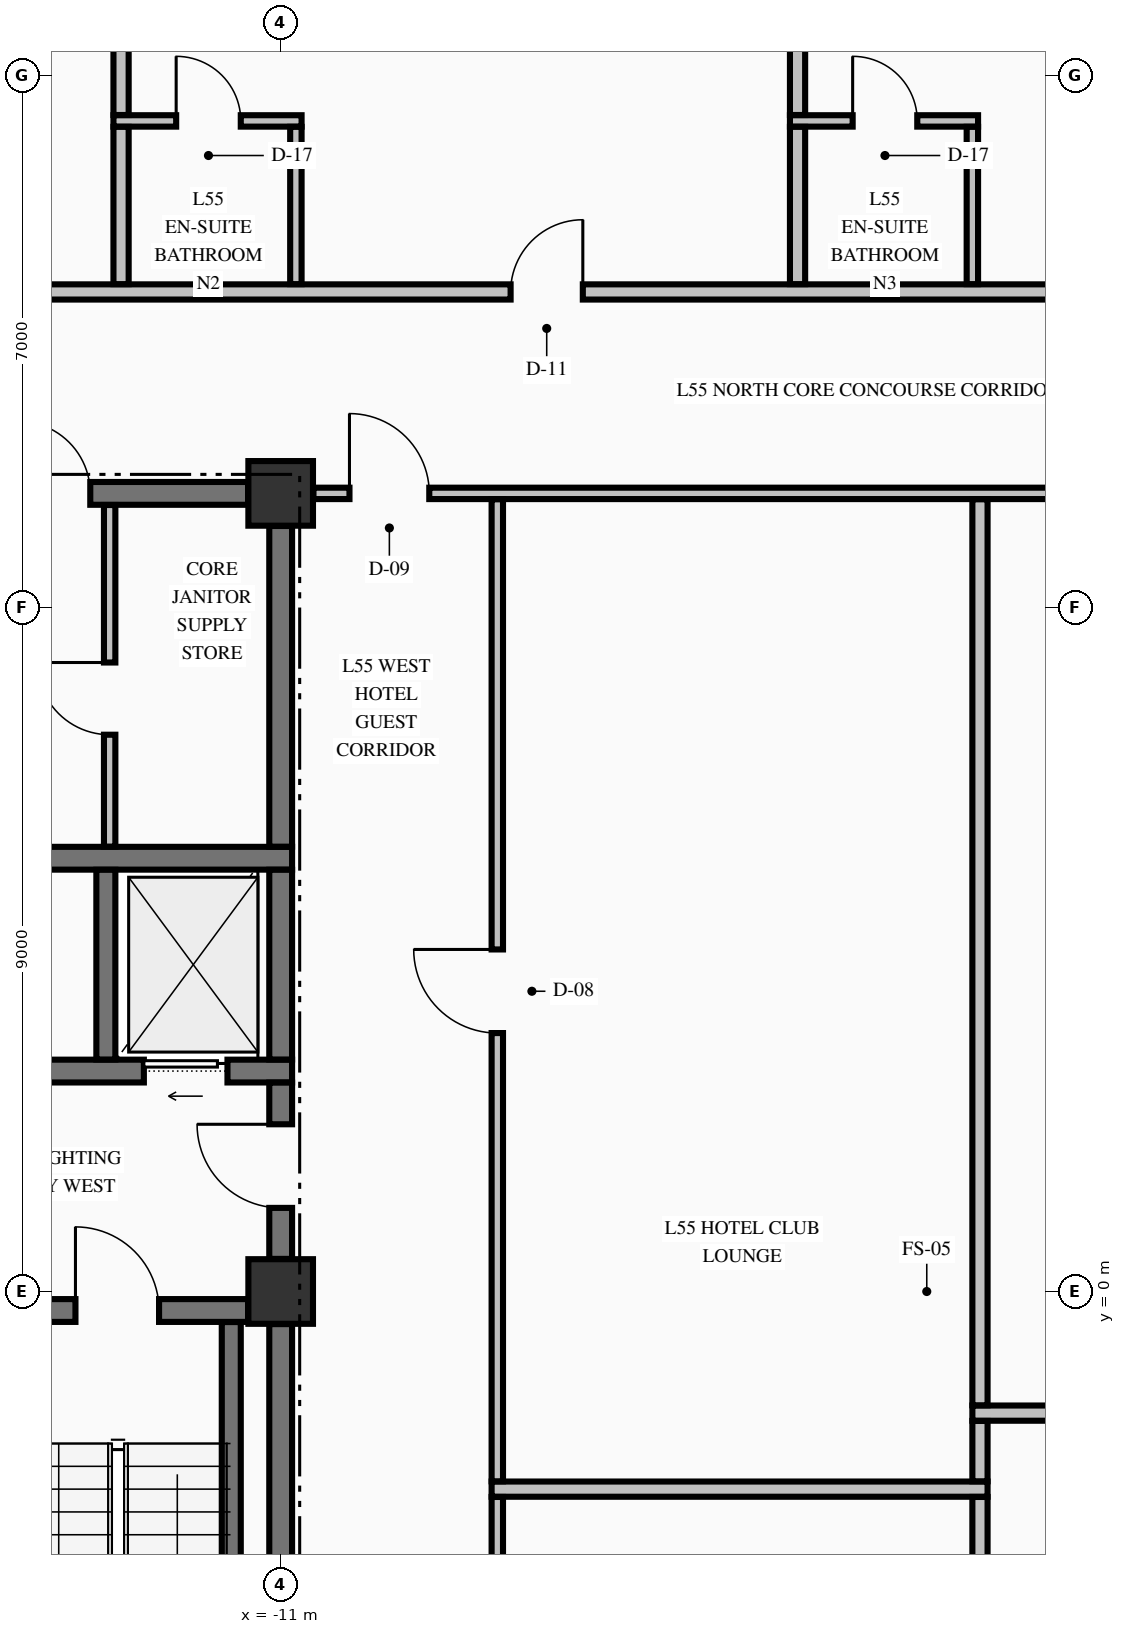
"""IFC4 building model, lengths in metres.
Left out: names, types, materials, properties, quantities, classifications, styles, units other than length and angle.
Written with IfcOpenShell. Run it as: python <this file> out.ifc"""

import sys

from ifc_helpers import new_model, si_unit, direction, frame, frame_2d, origin, origin_2d, place, context, subcontext, project, spatial, rectangle, extrude, element, fill, save


model = new_model("IFC4")
c1 = context("Model", 3, precision=1e-05, world=origin(), true_north=direction((0.0, 1.0)))
c2 = subcontext(c1, "Body", "Model", "MODEL_VIEW")
j1 = project(units=[si_unit("LENGTHUNIT", "METRE"), si_unit("PLANEANGLEUNIT", "RADIAN")], contexts=[c1])
p1 = place(None, origin())
s1 = spatial("IfcSite", under=j1, at=p1, CompositionType="ELEMENT")
p2 = place(p1, origin())
s2 = spatial("IfcBuilding", under=s1, at=p2, CompositionType="ELEMENT")
p3 = place(p2, frame((0.0, 0.0, 211.86)))
s3 = spatial("IfcBuildingStorey", under=s2, at=p3, CompositionType="ELEMENT", Elevation=211.86)
for number, where, z_axis, x_axis in (
    (1, (-11.0, 0.0, -0.325), (0.0, 0.0, 1.0), (1.0, 0.0, 0.0)),
    (2, (-11.0, 10.5, -0.325), (0.0, 0.0, 1.0), (1.0, 0.0, 0.0)),
):
    element("IfcColumn", number, at=place(p3, frame(where, z_axis=z_axis, x_axis=x_axis)), inside=s3, PredefinedType="COLUMN", context=c2, shape_type="SweptSolid", body=[
        extrude(rectangle(XDim=0.85, YDim=0.85, at=origin_2d()), origin(), (0.0, 0.0, 1.0), 3.475),
    ])
p4 = place(p3, frame((-19.571, -0.25, 0.0), z_axis=(0.0, 0.0, 1.0), x_axis=(1.0, 0.0, 0.0)))
e3 = element("IfcWall", 3, at=p4, inside=s3, PredefinedType="SHEAR", context=c2, shape_type="SweptSolid", body=[
    extrude(rectangle(XDim=8.142, YDim=0.3, at=frame_2d((4.071, 0.0))), origin(), (0.0, 0.0, 1.0), 3.15),
])
p5 = place(p4, frame((5.871, 0.0, 0.0)))
e4 = element("IfcOpeningElement", 4, at=p5, cuts=e3, PredefinedType="OPENING", context=c2, shape_type="SweptSolid", body=[
    extrude(rectangle(XDim=1.1, YDim=2.15, at=frame_2d((0.55, 1.075))), frame((0.0, 0.16, 0.0), z_axis=(0.0, -1.0, 0.0), x_axis=(1.0, 0.0, 0.0)), (0.0, 0.0, 1.0), 0.32),
])
p6 = place(p3, frame((-14.875, 2.9, 0.0), z_axis=(0.0, 0.0, 1.0), x_axis=(1.0, 0.0, 0.0)))
e5 = element("IfcWall", 5, at=p6, inside=s3, PredefinedType="SHEAR", context=c2, shape_type="SweptSolid", body=[
    extrude(rectangle(XDim=4.025, YDim=0.3, at=frame_2d((2.012, 0.0))), origin(), (0.0, 0.0, 1.0), 3.15),
])
p7 = place(p6, frame((2.075, 0.0, 0.0)))
e6 = element("IfcOpeningElement", 6, at=p7, cuts=e5, PredefinedType="OPENING", context=c2, shape_type="SweptSolid", body=[
    extrude(rectangle(XDim=1.1, YDim=2.2, at=frame_2d((0.55, 1.1))), frame((0.0, 0.16, 0.0), z_axis=(0.0, -1.0, 0.0), x_axis=(1.0, 0.0, 0.0)), (0.0, 0.0, 1.0), 0.32),
])
p8 = place(p3, frame((-14.875, 5.7, 0.0), z_axis=(0.0, 0.0, 1.0), x_axis=(1.0, 0.0, 0.0)))
e7 = element("IfcWall", 7, at=p8, inside=s3, PredefinedType="SHEAR", context=c2, shape_type="SweptSolid", body=[
    extrude(rectangle(XDim=4.025, YDim=0.3, at=frame_2d((2.012, 0.0))), origin(), (0.0, 0.0, 1.0), 3.15),
])
p9 = place(p3, frame((-14.7, 10.5, 0.0), z_axis=(0.0, 0.0, 1.0), x_axis=(1.0, 0.0, 0.0)))
e8 = element("IfcWall", 8, at=p9, inside=s3, PredefinedType="SHEAR", context=c2, shape_type="SweptSolid", body=[
    extrude(rectangle(XDim=3.271, YDim=0.3, at=frame_2d((1.635, 0.0))), origin(), (0.0, 0.0, 1.0), 3.15),
])
p10 = place(p9, frame((0.245, 0.0, 0.0)))
e9 = element("IfcOpeningElement", 9, at=p10, cuts=e8, PredefinedType="OPENING", context=c2, shape_type="SweptSolid", body=[
    extrude(rectangle(XDim=0.95, YDim=2.15, at=frame_2d((0.475, 1.075))), frame((0.0, 0.16, 0.0), z_axis=(0.0, -1.0, 0.0), x_axis=(1.0, 0.0, 0.0)), (0.0, 0.0, 1.0), 0.32),
])
p11 = place(p3, frame((-8.225, -2.6, 0.0), z_axis=(0.0, 0.0, 1.0), x_axis=(1.0, 0.0, 0.0)))
e10 = element("IfcWall", 10, at=p11, inside=s3, PredefinedType="PARTITIONING", context=c2, shape_type="SweptSolid", body=[
    extrude(rectangle(XDim=6.525, YDim=0.2, at=frame_2d((3.263, 0.0))), origin(), (0.0, 0.0, 1.0), 3.15),
])
p12 = place(p3, frame((-1.9, -1.6, 0.0), z_axis=(0.0, 0.0, 1.0), x_axis=(1.0, 0.0, 0.0)))
e11 = element("IfcWall", 11, at=p12, inside=s3, PredefinedType="PARTITIONING", context=c2, shape_type="SweptSolid", body=[
    extrude(rectangle(XDim=10.125, YDim=0.2, at=frame_2d((5.062, 0.0))), origin(), (0.0, 0.0, 1.0), 3.15),
])
p13 = place(p3, frame((-10.569, 10.5, 0.0), z_axis=(0.0, 0.0, 1.0), x_axis=(1.0, 0.0, 0.0)))
e12 = element("IfcWall", 12, at=p13, inside=s3, PredefinedType="PARTITIONING", context=c2, shape_type="SweptSolid", body=[
    extrude(rectangle(XDim=21.138, YDim=0.15, at=frame_2d((10.569, 0.0))), origin(), (0.0, 0.0, 1.0), 3.15),
])
p14 = place(p13, frame((0.474, 0.0, 0.0)))
e13 = element("IfcOpeningElement", 13, at=p14, cuts=e12, PredefinedType="OPENING", context=c2, shape_type="SweptSolid", body=[
    extrude(rectangle(XDim=1.05, YDim=2.15, at=frame_2d((0.525, 1.075))), frame((0.0, 0.085, 0.0), z_axis=(0.0, -1.0, 0.0), x_axis=(1.0, 0.0, 0.0)), (0.0, 0.0, 1.0), 0.17),
])
p15 = place(p13, frame((19.614, 0.0, 0.0)))
e14 = element("IfcOpeningElement", 14, at=p15, cuts=e12, PredefinedType="OPENING", context=c2, shape_type="SweptSolid", body=[
    extrude(rectangle(XDim=1.05, YDim=2.15, at=frame_2d((0.525, 1.075))), frame((0.0, 0.085, 0.0), z_axis=(0.0, -1.0, 0.0), x_axis=(1.0, 0.0, 0.0)), (0.0, 0.0, 1.0), 0.17),
])
p16 = place(p3, frame((-22.1, 13.15, 0.0), z_axis=(0.0, 0.0, 1.0), x_axis=(1.0, 0.0, 0.0)))
e15 = element("IfcWall", 15, at=p16, inside=s3, PredefinedType="PARTITIONING", context=c2, shape_type="SweptSolid", body=[
    extrude(rectangle(XDim=39.2, YDim=0.2, at=frame_2d((19.6, 0.0))), origin(), (0.0, 0.0, 1.0), 3.15),
])
p17 = place(p16, frame((5.125, 0.0, 0.0)))
e16 = element("IfcOpeningElement", 16, at=p17, cuts=e15, PredefinedType="OPENING", context=c2, shape_type="SweptSolid", body=[
    extrude(rectangle(XDim=1.05, YDim=2.15, at=frame_2d((0.525, 1.075))), frame((0.0, 0.11, 0.0), z_axis=(0.0, -1.0, 0.0), x_axis=(1.0, 0.0, 0.0)), (0.0, 0.0, 1.0), 0.22),
])
p18 = place(p16, frame((14.125, 0.0, 0.0)))
e17 = element("IfcOpeningElement", 17, at=p18, cuts=e15, PredefinedType="OPENING", context=c2, shape_type="SweptSolid", body=[
    extrude(rectangle(XDim=0.95, YDim=2.15, at=frame_2d((0.475, 1.075))), frame((0.0, 0.11, 0.0), z_axis=(0.0, -1.0, 0.0), x_axis=(1.0, 0.0, 0.0)), (0.0, 0.0, 1.0), 0.22),
])
p19 = place(p16, frame((21.375, 0.0, 0.0)))
e18 = element("IfcOpeningElement", 18, at=p19, cuts=e15, PredefinedType="OPENING", context=c2, shape_type="SweptSolid", body=[
    extrude(rectangle(XDim=0.95, YDim=2.15, at=frame_2d((0.475, 1.075))), frame((0.0, 0.11, 0.0), z_axis=(0.0, -1.0, 0.0), x_axis=(1.0, 0.0, 0.0)), (0.0, 0.0, 1.0), 0.22),
])
p20 = place(p16, frame((30.375, 0.0, 0.0)))
e19 = element("IfcOpeningElement", 19, at=p20, cuts=e15, PredefinedType="OPENING", context=c2, shape_type="SweptSolid", body=[
    extrude(rectangle(XDim=0.95, YDim=2.15, at=frame_2d((0.475, 1.075))), frame((0.0, 0.11, 0.0), z_axis=(0.0, -1.0, 0.0), x_axis=(1.0, 0.0, 0.0)), (0.0, 0.0, 1.0), 0.22),
])
p21 = place(p3, frame((-13.2, 15.4, 0.0), z_axis=(0.0, 0.0, 1.0), x_axis=(1.0, 0.0, 0.0)))
e20 = element("IfcWall", 20, at=p21, inside=s3, PredefinedType="PARTITIONING", context=c2, shape_type="SweptSolid", body=[
    extrude(rectangle(XDim=2.475, YDim=0.15, at=frame_2d((1.237, 0.0))), origin(), (0.0, 0.0, 1.0), 3.15),
])
p22 = place(p21, frame((0.825, 0.0, 0.0)))
e21 = element("IfcOpeningElement", 21, at=p22, cuts=e20, PredefinedType="OPENING", context=c2, shape_type="SweptSolid", body=[
    extrude(rectangle(XDim=0.85, YDim=2.1, at=frame_2d((0.425, 1.05))), frame((0.0, 0.085, 0.0), z_axis=(0.0, -1.0, 0.0), x_axis=(1.0, 0.0, 0.0)), (0.0, 0.0, 1.0), 0.17),
])
p23 = place(p3, frame((-4.3, 15.4, 0.0), z_axis=(0.0, 0.0, 1.0), x_axis=(1.0, 0.0, 0.0)))
e22 = element("IfcWall", 22, at=p23, inside=s3, PredefinedType="PARTITIONING", context=c2, shape_type="SweptSolid", body=[
    extrude(rectangle(XDim=2.475, YDim=0.15, at=frame_2d((1.238, 0.0))), origin(), (0.0, 0.0, 1.0), 3.15),
])
p24 = place(p23, frame((0.825, 0.0, 0.0)))
e23 = element("IfcOpeningElement", 23, at=p24, cuts=e22, PredefinedType="OPENING", context=c2, shape_type="SweptSolid", body=[
    extrude(rectangle(XDim=0.85, YDim=2.1, at=frame_2d((0.425, 1.05))), frame((0.0, 0.085, 0.0), z_axis=(0.0, -1.0, 0.0), x_axis=(1.0, 0.0, 0.0)), (0.0, 0.0, 1.0), 0.17),
])
p25 = place(p3, frame((-13.3, 3.052, 0.0), z_axis=(0.0, 0.0, 1.0), x_axis=(0.0, 1.0, 0.0)))
e24 = element("IfcWall", 24, at=p25, inside=s3, PredefinedType="SOLIDWALL", context=c2, shape_type="SweptSolid", body=[
    extrude(rectangle(XDim=2.496, YDim=0.25, at=frame_2d((1.248, 0.0))), origin(), (0.0, 0.0, 1.0), 3.15),
])
p26 = place(p3, frame((-11.65, -9.798, 0.0), z_axis=(0.0, 0.0, 1.0), x_axis=(0.0, 1.0, 0.0)))
e25 = element("IfcWall", 25, at=p26, inside=s3, PredefinedType="SOLIDWALL", context=c2, shape_type="SweptSolid", body=[
    extrude(rectangle(XDim=9.396, YDim=0.25, at=frame_2d((4.698, 0.0))), origin(), (0.0, 0.0, 1.0), 3.15),
])
p27 = place(p3, frame((-11.0, -9.521, 0.0), z_axis=(0.0, 0.0, 1.0), x_axis=(0.0, 1.0, 0.0)))
e26 = element("IfcWall", 26, at=p27, inside=s3, PredefinedType="SHEAR", context=c2, shape_type="SweptSolid", body=[
    extrude(rectangle(XDim=9.092, YDim=0.3, at=frame_2d((4.546, 0.0))), origin(), (0.0, 0.0, 1.0), 3.15),
])
p28 = place(p3, frame((-11.0, 0.429, 0.0), z_axis=(0.0, 0.0, 1.0), x_axis=(0.0, 1.0, 0.0)))
e27 = element("IfcWall", 27, at=p28, inside=s3, PredefinedType="SHEAR", context=c2, shape_type="SweptSolid", body=[
    extrude(rectangle(XDim=2.319, YDim=0.3, at=frame_2d((1.16, 0.0))), origin(), (0.0, 0.0, 1.0), 3.15),
])
p29 = place(p28, frame((0.671, 0.0, 0.0)))
e28 = element("IfcOpeningElement", 28, at=p29, cuts=e27, PredefinedType="OPENING", context=c2, shape_type="SweptSolid", body=[
    extrude(rectangle(XDim=1.1, YDim=2.15, at=frame_2d((0.55, 1.075))), frame((0.0, 0.16, 0.0), z_axis=(0.0, -1.0, 0.0), x_axis=(1.0, 0.0, 0.0)), (0.0, 0.0, 1.0), 0.32),
])
p30 = place(p3, frame((-11.0, 3.052, 0.0), z_axis=(0.0, 0.0, 1.0), x_axis=(0.0, 1.0, 0.0)))
e29 = element("IfcWall", 29, at=p30, inside=s3, PredefinedType="SHEAR", context=c2, shape_type="SweptSolid", body=[
    extrude(rectangle(XDim=2.496, YDim=0.3, at=frame_2d((1.248, 0.0))), origin(), (0.0, 0.0, 1.0), 3.15),
])
p31 = place(p3, frame((-11.0, 5.852, 0.0), z_axis=(0.0, 0.0, 1.0), x_axis=(0.0, 1.0, 0.0)))
e30 = element("IfcWall", 30, at=p31, inside=s3, PredefinedType="SHEAR", context=c2, shape_type="SweptSolid", body=[
    extrude(rectangle(XDim=4.219, YDim=0.3, at=frame_2d((2.109, 0.0))), origin(), (0.0, 0.0, 1.0), 3.15),
])
p32 = place(p3, frame((-13.25, 5.853, 0.0), z_axis=(0.0, 0.0, 1.0), x_axis=(0.0, 1.0, 0.0)))
e31 = element("IfcWall", 31, at=p32, inside=s3, PredefinedType="PARTITIONING", context=c2, shape_type="SweptSolid", body=[
    extrude(rectangle(XDim=4.494, YDim=0.15, at=frame_2d((2.247, 0.0))), origin(), (0.0, 0.0, 1.0), 3.15),
])
p33 = place(p32, frame((1.472, 0.0, 0.0)))
e32 = element("IfcOpeningElement", 32, at=p33, cuts=e31, PredefinedType="OPENING", context=c2, shape_type="SweptSolid", body=[
    extrude(rectangle(XDim=0.95, YDim=2.15, at=frame_2d((0.475, 1.075))), frame((0.0, 0.085, 0.0), z_axis=(0.0, -1.0, 0.0), x_axis=(1.0, 0.0, 0.0)), (0.0, 0.0, 1.0), 0.17),
])
p34 = place(p3, frame((-13.1, 13.253, 0.0), z_axis=(0.0, 0.0, 1.0), x_axis=(0.0, 1.0, 0.0)))
e33 = element("IfcWall", 33, at=p34, inside=s3, PredefinedType="PARTITIONING", context=c2, shape_type="SweptSolid", body=[
    extrude(rectangle(XDim=2.069, YDim=0.2, at=frame_2d((1.035, 0.0))), origin(), (0.0, 0.0, 1.0), 3.15),
])
p35 = place(p3, frame((-13.1, 15.478, 0.0), z_axis=(0.0, 0.0, 1.0), x_axis=(0.0, 1.0, 0.0)))
e34 = element("IfcWall", 34, at=p35, inside=s3, PredefinedType="PARTITIONING", context=c2, shape_type="SweptSolid", body=[
    extrude(rectangle(XDim=8.857, YDim=0.2, at=frame_2d((4.428, 0.0))), origin(), (0.0, 0.0, 1.0), 3.15),
])
p36 = place(p3, frame((-10.8, 13.253, 0.0), z_axis=(0.0, 0.0, 1.0), x_axis=(0.0, 1.0, 0.0)))
e35 = element("IfcWall", 35, at=p36, inside=s3, PredefinedType="PARTITIONING", context=c2, shape_type="SweptSolid", body=[
    extrude(rectangle(XDim=2.069, YDim=0.15, at=frame_2d((1.035, 0.0))), origin(), (0.0, 0.0, 1.0), 2.342),
])
p37 = place(p3, frame((-8.15, -9.872, 0.0), z_axis=(0.0, 0.0, 1.0), x_axis=(0.0, 1.0, 0.0)))
e36 = element("IfcWall", 36, at=p37, inside=s3, PredefinedType="PARTITIONING", context=c2, shape_type="SweptSolid", body=[
    extrude(rectangle(XDim=7.169, YDim=0.15, at=frame_2d((3.584, 0.0))), origin(), (0.0, 0.0, 1.0), 3.15),
])
p38 = place(p37, frame((3.102, 0.0, 0.0)))
e37 = element("IfcOpeningElement", 37, at=p38, cuts=e36, PredefinedType="OPENING", context=c2, shape_type="SweptSolid", body=[
    extrude(rectangle(XDim=1.0, YDim=2.15, at=frame_2d((0.5, 1.075))), frame((0.0, 0.085, 0.0), z_axis=(0.0, -1.0, 0.0), x_axis=(1.0, 0.0, 0.0)), (0.0, 0.0, 1.0), 0.17),
])
p39 = place(p3, frame((-8.15, -2.497, 0.0), z_axis=(0.0, 0.0, 1.0), x_axis=(0.0, 1.0, 0.0)))
e38 = element("IfcWall", 38, at=p39, inside=s3, PredefinedType="PARTITIONING", context=c2, shape_type="SweptSolid", body=[
    extrude(rectangle(XDim=12.919, YDim=0.15, at=frame_2d((6.459, 0.0))), origin(), (0.0, 0.0, 1.0), 3.15),
])
p40 = place(p39, frame((5.897, 0.0, 0.0)))
e39 = element("IfcOpeningElement", 39, at=p40, cuts=e38, PredefinedType="OPENING", context=c2, shape_type="SweptSolid", body=[
    extrude(rectangle(XDim=1.1, YDim=2.15, at=frame_2d((0.55, 1.075))), frame((0.0, 0.085, 0.0), z_axis=(0.0, -1.0, 0.0), x_axis=(1.0, 0.0, 0.0)), (0.0, 0.0, 1.0), 0.17),
])
p41 = place(p3, frame((-4.2, 13.253, 0.0), z_axis=(0.0, 0.0, 1.0), x_axis=(0.0, 1.0, 0.0)))
e40 = element("IfcWall", 40, at=p41, inside=s3, PredefinedType="PARTITIONING", context=c2, shape_type="SweptSolid", body=[
    extrude(rectangle(XDim=2.069, YDim=0.2, at=frame_2d((1.035, 0.0))), origin(), (0.0, 0.0, 1.0), 3.15),
])
p42 = place(p3, frame((-4.2, 15.478, 0.0), z_axis=(0.0, 0.0, 1.0), x_axis=(0.0, 1.0, 0.0)))
e41 = element("IfcWall", 41, at=p42, inside=s3, PredefinedType="PARTITIONING", context=c2, shape_type="SweptSolid", body=[
    extrude(rectangle(XDim=8.857, YDim=0.2, at=frame_2d((4.428, 0.0))), origin(), (0.0, 0.0, 1.0), 3.15),
])
p43 = place(p3, frame((-1.9, 13.253, 0.0), z_axis=(0.0, 0.0, 1.0), x_axis=(0.0, 1.0, 0.0)))
e42 = element("IfcWall", 42, at=p43, inside=s3, PredefinedType="PARTITIONING", context=c2, shape_type="SweptSolid", body=[
    extrude(rectangle(XDim=2.069, YDim=0.15, at=frame_2d((1.035, 0.0))), origin(), (0.0, 0.0, 1.0), 3.15),
])
p44 = place(p3, frame((-1.8, -5.097, 0.0), z_axis=(0.0, 0.0, 1.0), x_axis=(0.0, 1.0, 0.0)))
e43 = element("IfcWall", 43, at=p44, inside=s3, PredefinedType="PARTITIONING", context=c2, shape_type="SweptSolid", body=[
    extrude(rectangle(XDim=2.394, YDim=0.2, at=frame_2d((1.197, 0.0))), origin(), (0.0, 0.0, 1.0), 3.15),
])
p45 = place(p3, frame((-1.8, -2.497, 0.0), z_axis=(0.0, 0.0, 1.0), x_axis=(0.0, 1.0, 0.0)))
e44 = element("IfcWall", 44, at=p45, inside=s3, PredefinedType="PARTITIONING", context=c2, shape_type="SweptSolid", body=[
    extrude(rectangle(XDim=0.794, YDim=0.2, at=frame_2d((0.397, 0.0))), origin(), (0.0, 0.0, 1.0), 3.15),
])
p46 = place(p3, frame((-1.8, -1.497, 0.0), z_axis=(0.0, 0.0, 1.0), x_axis=(0.0, 1.0, 0.0)))
e45 = element("IfcWall", 45, at=p46, inside=s3, PredefinedType="PARTITIONING", context=c2, shape_type="SweptSolid", body=[
    extrude(rectangle(XDim=11.919, YDim=0.2, at=frame_2d((5.959, 0.0))), origin(), (0.0, 0.0, 1.0), 3.15),
])
p47 = place(p5, origin())
e46 = element("IfcDoor", 46, at=p47, inside=s3, OperationType="SINGLE_SWING_LEFT", PredefinedType="DOOR", context=c2, shape_type="SweptSolid", body=[
    extrude(rectangle(XDim=1.1, YDim=2.15, at=frame_2d((0.55, 1.075))), frame((0.0, 0.025, 0.0), z_axis=(0.0, -1.0, 0.0), x_axis=(1.0, 0.0, 0.0)), (0.0, 0.0, 1.0), 0.05),
])
fill(e4, e46)
p48 = place(p29, origin())
e47 = element("IfcDoor", 47, at=p48, inside=s3, OperationType="SINGLE_SWING_RIGHT", PredefinedType="DOOR", context=c2, shape_type="SweptSolid", body=[
    extrude(rectangle(XDim=1.1, YDim=2.15, at=frame_2d((0.55, 1.075))), frame((0.0, 0.025, 0.0), z_axis=(0.0, -1.0, 0.0), x_axis=(1.0, 0.0, 0.0)), (0.0, 0.0, 1.0), 0.05),
])
fill(e28, e47)
p49 = place(p7, origin())
e48 = element("IfcDoor", 48, at=p49, inside=s3, OperationType="SLIDING_TO_LEFT", PredefinedType="DOOR", context=c2, shape_type="SweptSolid", body=[
    extrude(rectangle(XDim=1.1, YDim=2.2, at=frame_2d((0.55, 1.1))), frame((0.0, 0.025, 0.0), z_axis=(0.0, -1.0, 0.0), x_axis=(1.0, 0.0, 0.0)), (0.0, 0.0, 1.0), 0.05),
])
fill(e6, e48)
p50 = place(p10, origin())
e49 = element("IfcDoor", 49, at=p50, inside=s3, OperationType="SINGLE_SWING_LEFT", PredefinedType="DOOR", context=c2, shape_type="SweptSolid", body=[
    extrude(rectangle(XDim=0.95, YDim=2.15, at=frame_2d((0.475, 1.075))), frame((0.0, 0.025, 0.0), z_axis=(0.0, -1.0, 0.0), x_axis=(1.0, 0.0, 0.0)), (0.0, 0.0, 1.0), 0.05),
])
fill(e9, e49)
p51 = place(p33, origin())
e50 = element("IfcDoor", 50, at=p51, inside=s3, OperationType="SINGLE_SWING_RIGHT", PredefinedType="DOOR", context=c2, shape_type="SweptSolid", body=[
    extrude(rectangle(XDim=0.95, YDim=2.15, at=frame_2d((0.475, 1.075))), frame((0.0, 0.025, 0.0), z_axis=(0.0, -1.0, 0.0), x_axis=(1.0, 0.0, 0.0)), (0.0, 0.0, 1.0), 0.05),
])
fill(e32, e50)
p52 = place(p14, origin())
e51 = element("IfcDoor", 51, at=p52, inside=s3, OperationType="SINGLE_SWING_LEFT", PredefinedType="DOOR", context=c2, shape_type="SweptSolid", body=[
    extrude(rectangle(XDim=1.05, YDim=2.15, at=frame_2d((0.525, 1.075))), frame((0.0, 0.025, 0.0), z_axis=(0.0, -1.0, 0.0), x_axis=(1.0, 0.0, 0.0)), (0.0, 0.0, 1.0), 0.05),
])
fill(e13, e51)
p53 = place(p18, origin())
e52 = element("IfcDoor", 52, at=p53, inside=s3, OperationType="SINGLE_SWING_RIGHT", PredefinedType="DOOR", context=c2, shape_type="SweptSolid", body=[
    extrude(rectangle(XDim=0.95, YDim=2.15, at=frame_2d((0.475, 1.075))), frame((0.0, 0.025, 0.0), z_axis=(0.0, -1.0, 0.0), x_axis=(1.0, 0.0, 0.0)), (0.0, 0.0, 1.0), 0.05),
])
fill(e17, e52)
p54 = place(p22, origin())
e53 = element("IfcDoor", 53, at=p54, inside=s3, OperationType="SINGLE_SWING_LEFT", PredefinedType="DOOR", context=c2, shape_type="SweptSolid", body=[
    extrude(rectangle(XDim=0.85, YDim=2.1, at=frame_2d((0.425, 1.05))), frame((0.0, 0.025, 0.0), z_axis=(0.0, -1.0, 0.0), x_axis=(1.0, 0.0, 0.0)), (0.0, 0.0, 1.0), 0.05),
])
fill(e21, e53)
p55 = place(p24, origin())
e54 = element("IfcDoor", 54, at=p55, inside=s3, OperationType="SINGLE_SWING_LEFT", PredefinedType="DOOR", context=c2, shape_type="SweptSolid", body=[
    extrude(rectangle(XDim=0.85, YDim=2.1, at=frame_2d((0.425, 1.05))), frame((0.0, 0.025, 0.0), z_axis=(0.0, -1.0, 0.0), x_axis=(1.0, 0.0, 0.0)), (0.0, 0.0, 1.0), 0.05),
])
fill(e23, e54)
p56 = place(p40, origin())
e55 = element("IfcDoor", 55, at=p56, inside=s3, OperationType="SINGLE_SWING_RIGHT", PredefinedType="DOOR", context=c2, shape_type="SweptSolid", body=[
    extrude(rectangle(XDim=1.1, YDim=2.15, at=frame_2d((0.55, 1.075))), frame((0.0, 0.025, 0.0), z_axis=(0.0, -1.0, 0.0), x_axis=(1.0, 0.0, 0.0)), (0.0, 0.0, 1.0), 0.05),
])
fill(e39, e55)
save(model, sys.argv[1])
